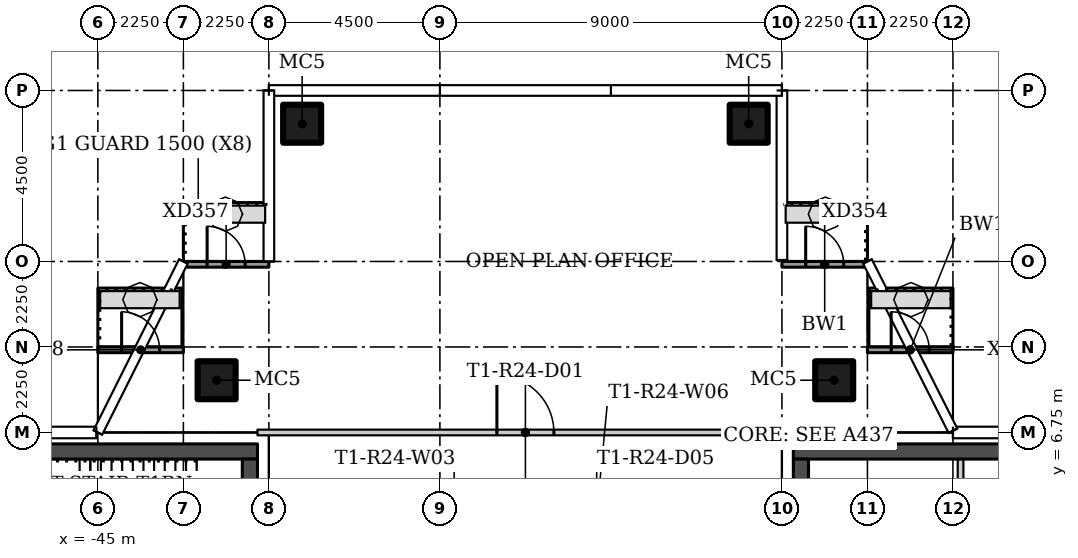
"""IFC4 building model, lengths in metres.
Left out: names, types, materials, properties, quantities, classifications, styles, units other than length and angle.
Written with IfcOpenShell. Run it as: python <this file> out.ifc"""

import sys

from ifc_helpers import new_model, si_unit, direction, frame, frame_2d, origin, origin_2d, place, context, subcontext, project, spatial, rectangle, hollow_rectangle, extrude, element, fill, save


model = new_model("IFC4")
c1 = context("Model", 3, precision=1e-05, world=origin(), true_north=direction((0.0, 1.0)))
c2 = subcontext(c1, "Body", "Model", "MODEL_VIEW")
j1 = project(units=[si_unit("LENGTHUNIT", "METRE"), si_unit("PLANEANGLEUNIT", "RADIAN")], contexts=[c1])
p1 = place(None, origin())
s1 = spatial("IfcSite", under=j1, at=p1, CompositionType="ELEMENT")
p2 = place(p1, origin())
s2 = spatial("IfcBuilding", under=s1, at=p2, CompositionType="ELEMENT")
p3 = place(p2, frame((0.0, 0.0, 221.7)))
s3 = spatial("IfcBuildingStorey", under=s2, at=p3, CompositionType="ELEMENT", Elevation=221.7)
for number, where in (
    (1, (-25.625, 8.125, 0.0)),
    (2, (-41.875, 8.125, 0.0)),
    (3, (-39.625, 14.875, 0.0)),
    (4, (-27.875, 14.875, 0.0)),
):
    element("IfcColumn", number, at=place(p3, frame(where)), inside=s3, PredefinedType="COLUMN", context=c2, shape_type="SweptSolid", body=[
        extrude(hollow_rectangle(XDim=1.0, YDim=1.0, WallThickness=0.04, at=origin_2d()), origin(), (0.0, 0.0, 1.0), 3.45),
    ])
p4 = place(p3, frame((-40.8, 6.75, 0.0)))
e5 = element("IfcWall", 5, at=p4, inside=s3, PredefinedType="PARTITIONING", context=c2, shape_type="SweptSolid", body=[
    extrude(rectangle(XDim=14.1, YDim=0.15, at=frame_2d((7.05, 0.0))), origin(), (0.0, 0.0, 1.0), 3.45),
])
p5 = place(p4, frame((6.3, 0.0, 0.0)))
e6 = element("IfcOpeningElement", 6, at=p5, cuts=e5, PredefinedType="OPENING", context=c2, shape_type="SweptSolid", body=[
    extrude(rectangle(XDim=1.5, YDim=2.1, at=frame_2d((0.75, 1.05))), frame((0.0, 0.085, 0.0), z_axis=(0.0, -1.0, 0.0), x_axis=(1.0, 0.0, 0.0)), (0.0, 0.0, 1.0), 0.17),
])
p6 = place(p3, frame((-24.75, 8.925, 0.0)))
e7 = element("IfcWall", 7, at=p6, inside=s3, PredefinedType="SOLIDWALL", context=c2, shape_type="SweptSolid", body=[
    extrude(rectangle(XDim=2.25, YDim=0.15, at=frame_2d((1.125, 0.0))), origin(), (0.0, 0.0, 1.0), 3.45),
])
p7 = place(p6, frame((0.625, 0.0, 0.0)))
e8 = element("IfcOpeningElement", 8, at=p7, cuts=e7, PredefinedType="OPENING", context=c2, shape_type="SweptSolid", body=[
    extrude(rectangle(XDim=1.0, YDim=2.4, at=frame_2d((0.5, 1.2))), frame((0.0, 0.085, 0.0), z_axis=(0.0, -1.0, 0.0), x_axis=(1.0, 0.0, 0.0)), (0.0, 0.0, 1.0), 0.17),
])
p8 = place(p3, frame((-27.0, 11.175, 0.0)))
e9 = element("IfcWall", 9, at=p8, inside=s3, PredefinedType="SOLIDWALL", context=c2, shape_type="SweptSolid", body=[
    extrude(rectangle(XDim=2.25, YDim=0.15, at=frame_2d((1.125, 0.0))), origin(), (0.0, 0.0, 1.0), 3.45),
])
p9 = place(p8, frame((0.625, 0.0, 0.0)))
e10 = element("IfcOpeningElement", 10, at=p9, cuts=e9, PredefinedType="OPENING", context=c2, shape_type="SweptSolid", body=[
    extrude(rectangle(XDim=1.0, YDim=2.4, at=frame_2d((0.5, 1.2))), frame((0.0, 0.085, 0.0), z_axis=(0.0, -1.0, 0.0), x_axis=(1.0, 0.0, 0.0)), (0.0, 0.0, 1.0), 0.17),
])
p10 = place(p3, frame((-42.75, 11.175, 0.0)))
e11 = element("IfcWall", 11, at=p10, inside=s3, PredefinedType="SOLIDWALL", context=c2, shape_type="SweptSolid", body=[
    extrude(rectangle(XDim=2.25, YDim=0.15, at=frame_2d((1.125, 0.0))), origin(), (0.0, 0.0, 1.0), 3.45),
])
p11 = place(p10, frame((0.625, 0.0, 0.0)))
e12 = element("IfcOpeningElement", 12, at=p11, cuts=e11, PredefinedType="OPENING", context=c2, shape_type="SweptSolid", body=[
    extrude(rectangle(XDim=1.0, YDim=2.4, at=frame_2d((0.5, 1.2))), frame((0.0, 0.085, 0.0), z_axis=(0.0, -1.0, 0.0), x_axis=(1.0, 0.0, 0.0)), (0.0, 0.0, 1.0), 0.17),
])
p12 = place(p3, frame((-45.0, 8.925, 0.0)))
e13 = element("IfcWall", 13, at=p12, inside=s3, PredefinedType="SOLIDWALL", context=c2, shape_type="SweptSolid", body=[
    extrude(rectangle(XDim=2.25, YDim=0.15, at=frame_2d((1.125, 0.0))), origin(), (0.0, 0.0, 1.0), 3.45),
])
p13 = place(p12, frame((0.625, 0.0, 0.0)))
e14 = element("IfcOpeningElement", 14, at=p13, cuts=e13, PredefinedType="OPENING", context=c2, shape_type="SweptSolid", body=[
    extrude(rectangle(XDim=1.0, YDim=2.4, at=frame_2d((0.5, 1.2))), frame((0.0, 0.085, 0.0), z_axis=(0.0, -1.0, 0.0), x_axis=(1.0, 0.0, 0.0)), (0.0, 0.0, 1.0), 0.17),
])
p14 = place(p3, frame((-26.7, 6.25, 0.0)))
e15 = element("IfcWall", 15, at=p14, inside=s3, PredefinedType="SHEAR", context=c2, shape_type="SweptSolid", body=[
    extrude(rectangle(XDim=12.9, YDim=0.4, at=frame_2d((6.45, 0.0))), origin(), (0.0, 0.0, 1.0), 3.45),
])
p15 = place(p3, frame((-26.5, 6.05, 0.0), z_axis=(0.0, 0.0, 1.0), x_axis=(0.0, -1.0, 0.0)))
e16 = element("IfcWall", 16, at=p15, inside=s3, PredefinedType="SHEAR", context=c2, shape_type="SweptSolid", body=[
    extrude(rectangle(XDim=12.1, YDim=0.4, at=frame_2d((6.05, 0.0))), origin(), (0.0, 0.0, 1.0), 3.45),
])
p16 = place(p15, frame((3.9, 0.0, 0.0)))
e17 = element("IfcOpeningElement", 17, at=p16, cuts=e16, PredefinedType="OPENING", context=c2, shape_type="SweptSolid", body=[
    extrude(rectangle(XDim=1.8, YDim=2.4, at=frame_2d((0.9, 1.2))), frame((0.0, 0.21, 0.0), z_axis=(0.0, -1.0, 0.0), x_axis=(1.0, 0.0, 0.0)), (0.0, 0.0, 1.0), 0.42),
])
p17 = place(p3, frame((-22.3, 3.25, 0.0), z_axis=(0.0, 0.0, 1.0), x_axis=(0.0, 1.0, 0.0)))
e18 = element("IfcWall", 18, at=p17, inside=s3, PredefinedType="PARTITIONING", context=c2, shape_type="SweptSolid", body=[
    extrude(rectangle(XDim=2.8, YDim=0.15, at=frame_2d((1.4, 0.0))), origin(), (0.0, 0.0, 1.0), 3.45),
])
p18 = place(p3, frame((-40.8, 6.25, 0.0), z_axis=(0.0, 0.0, 1.0), x_axis=(-1.0, 0.0, 0.0)))
e19 = element("IfcWall", 19, at=p18, inside=s3, PredefinedType="SHEAR", context=c2, shape_type="SweptSolid", body=[
    extrude(rectangle(XDim=12.9, YDim=0.4, at=frame_2d((6.45, 0.0))), origin(), (0.0, 0.0, 1.0), 3.45),
])
p19 = place(p3, frame((-41.0, -6.05, 0.0), z_axis=(0.0, 0.0, 1.0), x_axis=(0.0, 1.0, 0.0)))
e20 = element("IfcWall", 20, at=p19, inside=s3, PredefinedType="SHEAR", context=c2, shape_type="SweptSolid", body=[
    extrude(rectangle(XDim=12.1, YDim=0.4, at=frame_2d((6.05, 0.0))), origin(), (0.0, 0.0, 1.0), 3.45),
])
p20 = place(p19, frame((6.4, 0.0, 0.0)))
e21 = element("IfcOpeningElement", 21, at=p20, cuts=e20, PredefinedType="OPENING", context=c2, shape_type="SweptSolid", body=[
    extrude(rectangle(XDim=1.8, YDim=2.4, at=frame_2d((0.9, 1.2))), frame((0.0, 0.21, 0.0), z_axis=(0.0, -1.0, 0.0), x_axis=(1.0, 0.0, 0.0)), (0.0, 0.0, 1.0), 0.42),
])
p21 = place(p5, origin())
e22 = element("IfcDoor", 22, at=p21, inside=s3, OperationType="DOUBLE_DOOR_SINGLE_SWING", PredefinedType="DOOR", context=c2, shape_type="SweptSolid", body=[
    extrude(rectangle(XDim=1.5, YDim=2.1, at=frame_2d((0.75, 1.05))), frame((0.0, 0.025, 0.0), z_axis=(0.0, -1.0, 0.0), x_axis=(1.0, 0.0, 0.0)), (0.0, 0.0, 1.0), 0.05),
])
fill(e6, e22)
p22 = place(p7, origin())
e23 = element("IfcDoor", 23, at=p22, inside=s3, OperationType="SINGLE_SWING_RIGHT", PredefinedType="DOOR", context=c2, shape_type="SweptSolid", body=[
    extrude(rectangle(XDim=1.0, YDim=2.4, at=frame_2d((0.5, 1.2))), frame((0.0, 0.025, 0.0), z_axis=(0.0, -1.0, 0.0), x_axis=(1.0, 0.0, 0.0)), (0.0, 0.0, 1.0), 0.05),
])
fill(e8, e23)
p23 = place(p9, origin())
e24 = element("IfcDoor", 24, at=p23, inside=s3, OperationType="SINGLE_SWING_LEFT", PredefinedType="DOOR", context=c2, shape_type="SweptSolid", body=[
    extrude(rectangle(XDim=1.0, YDim=2.4, at=frame_2d((0.5, 1.2))), frame((0.0, 0.025, 0.0), z_axis=(0.0, -1.0, 0.0), x_axis=(1.0, 0.0, 0.0)), (0.0, 0.0, 1.0), 0.05),
])
fill(e10, e24)
p24 = place(p11, origin())
e25 = element("IfcDoor", 25, at=p24, inside=s3, OperationType="SINGLE_SWING_LEFT", PredefinedType="DOOR", context=c2, shape_type="SweptSolid", body=[
    extrude(rectangle(XDim=1.0, YDim=2.4, at=frame_2d((0.5, 1.2))), frame((0.0, 0.025, 0.0), z_axis=(0.0, -1.0, 0.0), x_axis=(1.0, 0.0, 0.0)), (0.0, 0.0, 1.0), 0.05),
])
fill(e12, e25)
p25 = place(p13, origin())
e26 = element("IfcDoor", 26, at=p25, inside=s3, OperationType="SINGLE_SWING_RIGHT", PredefinedType="DOOR", context=c2, shape_type="SweptSolid", body=[
    extrude(rectangle(XDim=1.0, YDim=2.4, at=frame_2d((0.5, 1.2))), frame((0.0, 0.025, 0.0), z_axis=(0.0, -1.0, 0.0), x_axis=(1.0, 0.0, 0.0)), (0.0, 0.0, 1.0), 0.05),
])
fill(e14, e26)
save(model, sys.argv[1])
